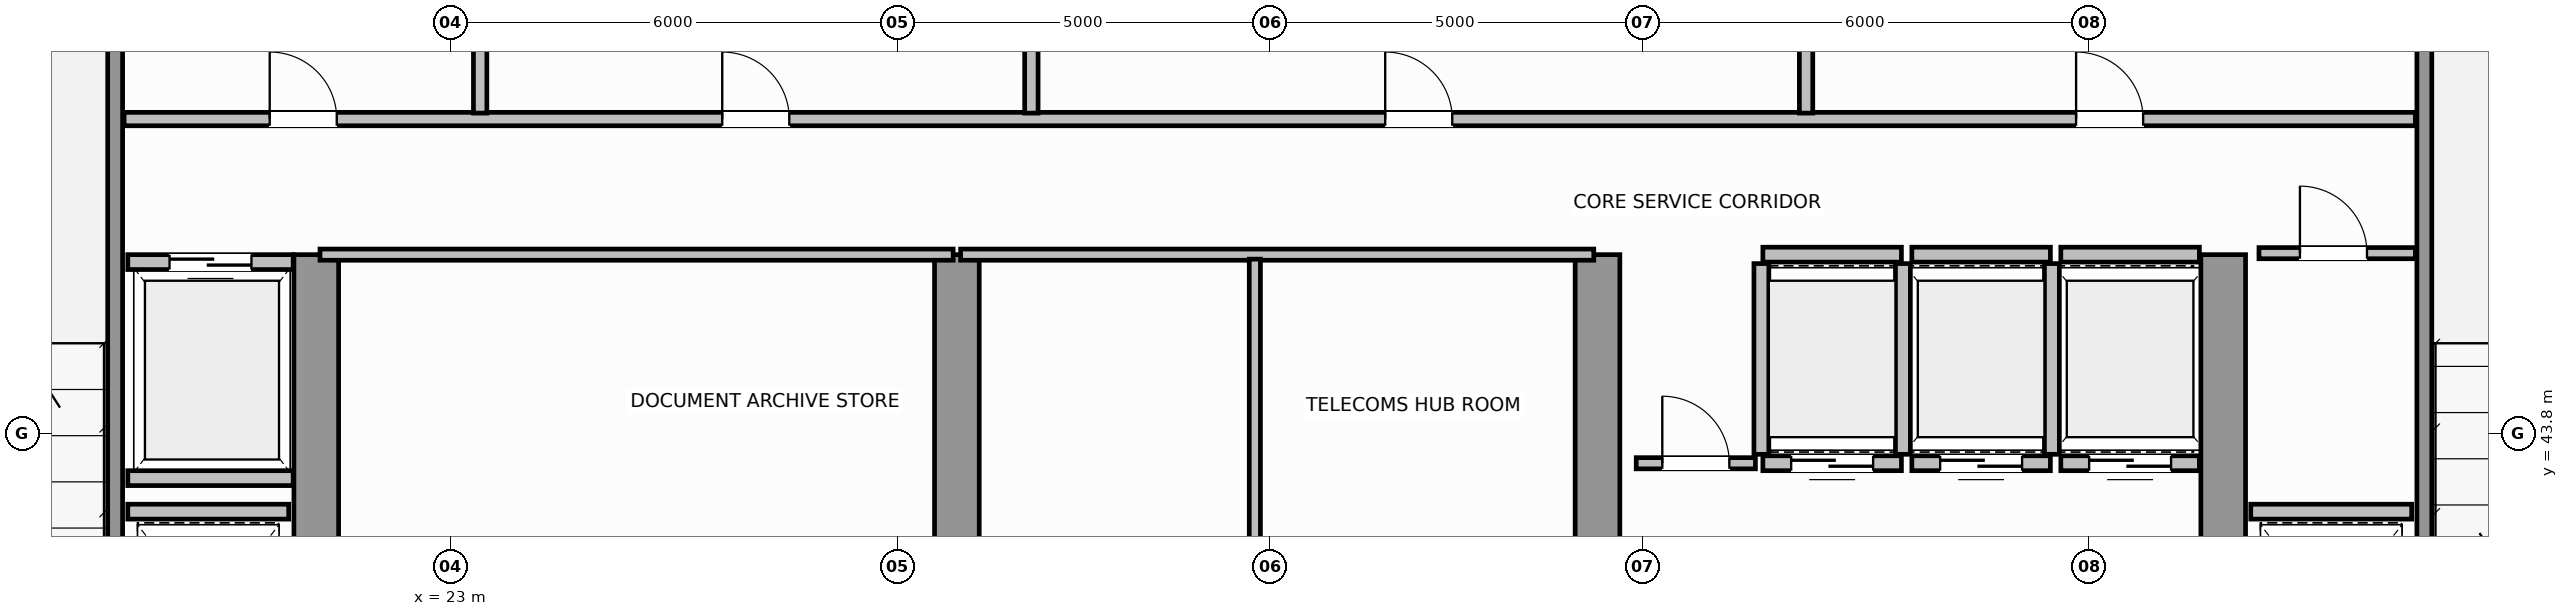
"""IFC4 building model, lengths in metres.
Left out: names, types, materials, properties, quantities, classifications, styles, units other than length and angle.
Written with IfcOpenShell. Run it as: python <this file> out.ifc"""

import sys

from ifc_helpers import new_model, si_unit, direction, frame, frame_2d, origin, place, context, subcontext, project, spatial, rectangle, extrude, source, transform, mapped, element, fill, save


model = new_model("IFC4")
c1 = context("Model", 3, precision=1e-05, world=origin(), true_north=direction((0.0, 1.0)))
c2 = subcontext(c1, "Body", "Model", "MODEL_VIEW")
j1 = project(units=[si_unit("LENGTHUNIT", "METRE"), si_unit("PLANEANGLEUNIT", "RADIAN")], contexts=[c1])
p1 = place(None, origin())
s1 = spatial("IfcSite", under=j1, at=p1, CompositionType="ELEMENT")
p2 = place(p1, origin())
s2 = spatial("IfcBuilding", under=s1, at=p2, CompositionType="ELEMENT")
p3 = place(p2, frame((0.0, 0.0, 238.4)))
s3 = spatial("IfcBuildingStorey", under=s2, at=p3, CompositionType="ELEMENT", Elevation=238.4)
for number, where, z_axis, x_axis in (
    (1, (21.2, 36.82, 0.0), (0.0, 0.0, 1.0), (0.0, 1.0, 0.0)),
    (2, (29.8, 36.82, 0.0), (0.0, 0.0, 1.0), (0.0, 1.0, 0.0)),
    (3, (38.4, 36.82, 0.0), (0.0, 0.0, 1.0), (0.0, 1.0, 0.0)),
    (4, (46.8, 36.82, 0.0), (0.0, 0.0, 1.0), (0.0, 1.0, 0.0)),
):
    element("IfcWall", number, at=place(p3, frame(where, z_axis=z_axis, x_axis=x_axis)), inside=s3, PredefinedType="SHEAR", context=c2, shape_type="SweptSolid", body=[
        extrude(rectangle(XDim=9.38, YDim=0.6, at=frame_2d((4.69, 0.0))), origin(), (0.0, 0.0, 1.0), 3.8),
    ])
for number, where, z_axis, x_axis in (
    (5, (18.5, 39.96, 0.0), (0.0, 0.0, 1.0), (0.0, 1.0, 0.0)),
    (6, (49.5, 39.96, 0.0), (0.0, 0.0, 1.0), (0.0, 1.0, 0.0)),
):
    element("IfcWall", number, at=place(p3, frame(where, z_axis=z_axis, x_axis=x_axis)), inside=s3, PredefinedType="SOLIDWALL", context=c2, shape_type="SweptSolid", body=[
        extrude(rectangle(XDim=9.93, YDim=0.2, at=frame_2d((4.965, 0.0))), origin(), (0.0, 0.0, 1.0), 3.8),
    ])
p4 = place(p3, frame((40.62, 43.4, 0.0), z_axis=(0.0, 0.0, 1.0), x_axis=(1.0, 0.0, 0.0)))
e7 = element("IfcWall", 7, at=p4, inside=s3, PredefinedType="SOLIDWALL", context=c2, shape_type="SweptSolid", body=[
    extrude(rectangle(XDim=1.86, YDim=0.2, at=frame_2d((0.93, 0.0))), origin(), (0.0, 0.0, 1.0), 3.58),
])
p5 = place(p4, frame((0.38, 0.0, 0.0)))
e8 = element("IfcOpeningElement", 8, at=p5, cuts=e7, PredefinedType="OPENING", context=c2, shape_type="SweptSolid", body=[
    extrude(rectangle(XDim=1.1, YDim=2.15, at=frame_2d((0.55, 1.075))), frame((0.0, 0.11, 0.0), z_axis=(0.0, -1.0, 0.0), x_axis=(1.0, 0.0, 0.0)), (0.0, 0.0, 1.0), 0.22),
])
p6 = place(p3, frame((40.62, 46.2, 0.0), z_axis=(0.0, 0.0, 1.0), x_axis=(1.0, 0.0, 0.0)))
e9 = element("IfcWall", 9, at=p6, inside=s3, PredefinedType="SOLIDWALL", context=c2, shape_type="SweptSolid", body=[
    extrude(rectangle(XDim=1.86, YDim=0.2, at=frame_2d((0.93, 0.0))), origin(), (0.0, 0.0, 1.0), 3.58),
])
for number, where, z_axis, x_axis in (
    (10, (40.6, 43.52, 0.0), (0.0, 0.0, 1.0), (0.0, 1.0, 0.0)),
    (11, (42.5, 43.52, 0.0), (0.0, 0.0, 1.0), (0.0, 1.0, 0.0)),
):
    element("IfcWall", number, at=place(p3, frame(where, z_axis=z_axis, x_axis=x_axis)), inside=s3, PredefinedType="SOLIDWALL", context=c2, shape_type="SweptSolid", body=[
        extrude(rectangle(XDim=2.56, YDim=0.2, at=frame_2d((1.28, 0.0))), origin(), (0.0, 0.0, 1.0), 3.58),
    ])
p7 = place(p3, frame((42.62, 43.4, 0.0), z_axis=(0.0, 0.0, 1.0), x_axis=(1.0, 0.0, 0.0)))
e12 = element("IfcWall", 12, at=p7, inside=s3, PredefinedType="SOLIDWALL", context=c2, shape_type="SweptSolid", body=[
    extrude(rectangle(XDim=1.86, YDim=0.2, at=frame_2d((0.93, 0.0))), origin(), (0.0, 0.0, 1.0), 3.58),
])
p8 = place(p7, frame((0.38, 0.0, 0.0)))
e13 = element("IfcOpeningElement", 13, at=p8, cuts=e12, PredefinedType="OPENING", context=c2, shape_type="SweptSolid", body=[
    extrude(rectangle(XDim=1.1, YDim=2.15, at=frame_2d((0.55, 1.075))), frame((0.0, 0.11, 0.0), z_axis=(0.0, -1.0, 0.0), x_axis=(1.0, 0.0, 0.0)), (0.0, 0.0, 1.0), 0.22),
])
p9 = place(p3, frame((42.62, 46.2, 0.0), z_axis=(0.0, 0.0, 1.0), x_axis=(1.0, 0.0, 0.0)))
e14 = element("IfcWall", 14, at=p9, inside=s3, PredefinedType="SOLIDWALL", context=c2, shape_type="SweptSolid", body=[
    extrude(rectangle(XDim=1.86, YDim=0.2, at=frame_2d((0.93, 0.0))), origin(), (0.0, 0.0, 1.0), 3.58),
])
p10 = place(p3, frame((44.5, 43.52, 0.0), z_axis=(0.0, 0.0, 1.0), x_axis=(0.0, 1.0, 0.0)))
e15 = element("IfcWall", 15, at=p10, inside=s3, PredefinedType="SOLIDWALL", context=c2, shape_type="SweptSolid", body=[
    extrude(rectangle(XDim=2.56, YDim=0.2, at=frame_2d((1.28, 0.0))), origin(), (0.0, 0.0, 1.0), 3.58),
])
p11 = place(p3, frame((44.62, 43.4, 0.0), z_axis=(0.0, 0.0, 1.0), x_axis=(1.0, 0.0, 0.0)))
e16 = element("IfcWall", 16, at=p11, inside=s3, PredefinedType="SOLIDWALL", context=c2, shape_type="SweptSolid", body=[
    extrude(rectangle(XDim=1.86, YDim=0.2, at=frame_2d((0.93, 0.0))), origin(), (0.0, 0.0, 1.0), 3.58),
])
p12 = place(p11, frame((0.38, 0.0, 0.0)))
e17 = element("IfcOpeningElement", 17, at=p12, cuts=e16, PredefinedType="OPENING", context=c2, shape_type="SweptSolid", body=[
    extrude(rectangle(XDim=1.1, YDim=2.15, at=frame_2d((0.55, 1.075))), frame((0.0, 0.11, 0.0), z_axis=(0.0, -1.0, 0.0), x_axis=(1.0, 0.0, 0.0)), (0.0, 0.0, 1.0), 0.22),
])
p13 = place(p3, frame((44.62, 46.2, 0.0), z_axis=(0.0, 0.0, 1.0), x_axis=(1.0, 0.0, 0.0)))
e18 = element("IfcWall", 18, at=p13, inside=s3, PredefinedType="SOLIDWALL", context=c2, shape_type="SweptSolid", body=[
    extrude(rectangle(XDim=1.86, YDim=0.2, at=frame_2d((0.93, 0.0))), origin(), (0.0, 0.0, 1.0), 3.58),
])
p14 = place(p3, frame((18.67, 46.1, 0.0), z_axis=(0.0, 0.0, 1.0), x_axis=(1.0, 0.0, 0.0)))
e19 = element("IfcWall", 19, at=p14, inside=s3, PredefinedType="SOLIDWALL", context=c2, shape_type="SweptSolid", body=[
    extrude(rectangle(XDim=2.22, YDim=0.2, at=frame_2d((1.11, 0.0))), origin(), (0.0, 0.0, 1.0), 3.58),
])
p15 = place(p14, frame((0.56, 0.0, 0.0)))
e20 = element("IfcOpeningElement", 20, at=p15, cuts=e19, PredefinedType="OPENING", context=c2, shape_type="SweptSolid", body=[
    extrude(rectangle(XDim=1.1, YDim=2.15, at=frame_2d((0.55, 1.075))), frame((0.0, 0.11, 0.0), z_axis=(0.0, -1.0, 0.0), x_axis=(1.0, 0.0, 0.0)), (0.0, 0.0, 1.0), 0.22),
])
p16 = place(p3, frame((18.67, 43.2, 0.0), z_axis=(0.0, 0.0, 1.0), x_axis=(1.0, 0.0, 0.0)))
e21 = element("IfcWall", 21, at=p16, inside=s3, PredefinedType="SOLIDWALL", context=c2, shape_type="SweptSolid", body=[
    extrude(rectangle(XDim=2.22, YDim=0.2, at=frame_2d((1.11, 0.0))), origin(), (0.0, 0.0, 1.0), 3.58),
])
for number, where, z_axis, x_axis in (
    (22, (18.67, 42.75, 0.0), (0.0, 0.0, 1.0), (1.0, 0.0, 0.0)),
    (23, (47.17, 42.75, 0.0), (0.0, 0.0, 1.0), (1.0, 0.0, 0.0)),
):
    element("IfcWall", number, at=place(p3, frame(where, z_axis=z_axis, x_axis=x_axis)), inside=s3, PredefinedType="SOLIDWALL", context=c2, shape_type="SweptSolid", body=[
        extrude(rectangle(XDim=2.16, YDim=0.2, at=frame_2d((1.08, 0.0))), origin(), (0.0, 0.0, 1.0), 3.58),
    ])
for number, where, z_axis, x_axis in (
    (24, (21.25, 46.2, 0.0), (0.0, 0.0, 1.0), (1.0, 0.0, 0.0)),
    (25, (29.85, 46.2, 0.0), (0.0, 0.0, 1.0), (1.0, 0.0, 0.0)),
):
    element("IfcWall", number, at=place(p3, frame(where, z_axis=z_axis, x_axis=x_axis)), inside=s3, PredefinedType="PARTITIONING", context=c2, shape_type="SweptSolid", body=[
        extrude(rectangle(XDim=8.5, YDim=0.15, at=frame_2d((4.25, 0.0))), origin(), (0.0, 0.0, 1.0), 3.58),
    ])
p17 = place(p3, frame((33.8, 36.56, 0.0), z_axis=(0.0, 0.0, 1.0), x_axis=(0.0, 1.0, 0.0)))
e26 = element("IfcWall", 26, at=p17, inside=s3, PredefinedType="PARTITIONING", context=c2, shape_type="SweptSolid", body=[
    extrude(rectangle(XDim=9.58, YDim=0.15, at=frame_2d((4.79, 0.0))), origin(), (0.0, 0.0, 1.0), 3.58),
])
p18 = place(p17, frame((4.2, 0.0, 0.0)))
e27 = element("IfcOpeningElement", 27, at=p18, cuts=e26, PredefinedType="OPENING", context=c2, shape_type="SweptSolid", body=[
    extrude(rectangle(XDim=0.9, YDim=2.1, at=frame_2d((0.45, 1.05))), frame((0.0, 0.085, 0.0), z_axis=(0.0, -1.0, 0.0), x_axis=(1.0, 0.0, 0.0)), (0.0, 0.0, 1.0), 0.17),
])
p19 = place(p3, frame((47.28, 46.22, 0.0), z_axis=(0.0, 0.0, 1.0), x_axis=(1.0, 0.0, 0.0)))
e28 = element("IfcWall", 28, at=p19, inside=s3, PredefinedType="PARTITIONING", context=c2, shape_type="SweptSolid", body=[
    extrude(rectangle(XDim=2.1, YDim=0.15, at=frame_2d((1.05, 0.0))), origin(), (0.0, 0.0, 1.0), 3.58),
])
p20 = place(p19, frame((0.55, 0.0, 0.0)))
e29 = element("IfcOpeningElement", 29, at=p20, cuts=e28, PredefinedType="OPENING", context=c2, shape_type="SweptSolid", body=[
    extrude(rectangle(XDim=0.9, YDim=2.1, at=frame_2d((0.45, 1.05))), frame((0.0, 0.085, 0.0), z_axis=(0.0, -1.0, 0.0), x_axis=(1.0, 0.0, 0.0)), (0.0, 0.0, 1.0), 0.17),
])
p21 = place(p3, frame((38.92, 43.4, 0.0), z_axis=(0.0, 0.0, 1.0), x_axis=(1.0, 0.0, 0.0)))
e30 = element("IfcWall", 30, at=p21, inside=s3, PredefinedType="PARTITIONING", context=c2, shape_type="SweptSolid", body=[
    extrude(rectangle(XDim=1.6, YDim=0.15, at=frame_2d((0.8, 0.0))), origin(), (0.0, 0.0, 1.0), 3.58),
])
p22 = place(p21, frame((0.35, 0.0, 0.0)))
e31 = element("IfcOpeningElement", 31, at=p22, cuts=e30, PredefinedType="OPENING", context=c2, shape_type="SweptSolid", body=[
    extrude(rectangle(XDim=0.9, YDim=2.1, at=frame_2d((0.45, 1.05))), frame((0.0, 0.085, 0.0), z_axis=(0.0, -1.0, 0.0), x_axis=(1.0, 0.0, 0.0)), (0.0, 0.0, 1.0), 0.17),
])
p23 = place(p3, frame((18.62, 48.02, 0.0), z_axis=(0.0, 0.0, 1.0), x_axis=(1.0, 0.0, 0.0)))
e32 = element("IfcWall", 32, at=p23, inside=s3, PredefinedType="PLUMBINGWALL", context=c2, shape_type="SweptSolid", body=[
    extrude(rectangle(XDim=30.76, YDim=0.18, at=frame_2d((15.38, 0.0))), origin(), (0.0, 0.0, 1.0), 3.58),
])
p24 = place(p23, frame((1.955, 0.0, 0.0)))
e33 = element("IfcOpeningElement", 33, at=p24, cuts=e32, PredefinedType="OPENING", context=c2, shape_type="SweptSolid", body=[
    extrude(rectangle(XDim=0.9, YDim=2.15, at=frame_2d((0.45, 1.075))), frame((0.0, 0.1, 0.0), z_axis=(0.0, -1.0, 0.0), x_axis=(1.0, 0.0, 0.0)), (0.0, 0.0, 1.0), 0.2),
])
p25 = place(p23, frame((8.03, 0.0, 0.0)))
e34 = element("IfcOpeningElement", 34, at=p25, cuts=e32, PredefinedType="OPENING", context=c2, shape_type="SweptSolid", body=[
    extrude(rectangle(XDim=0.9, YDim=2.15, at=frame_2d((0.45, 1.075))), frame((0.0, 0.1, 0.0), z_axis=(0.0, -1.0, 0.0), x_axis=(1.0, 0.0, 0.0)), (0.0, 0.0, 1.0), 0.2),
])
p26 = place(p23, frame((16.93, 0.0, 0.0)))
e35 = element("IfcOpeningElement", 35, at=p26, cuts=e32, PredefinedType="OPENING", context=c2, shape_type="SweptSolid", body=[
    extrude(rectangle(XDim=0.9, YDim=2.15, at=frame_2d((0.45, 1.075))), frame((0.0, 0.1, 0.0), z_axis=(0.0, -1.0, 0.0), x_axis=(1.0, 0.0, 0.0)), (0.0, 0.0, 1.0), 0.2),
])
p27 = place(p23, frame((26.205, 0.0, 0.0)))
e36 = element("IfcOpeningElement", 36, at=p27, cuts=e32, PredefinedType="OPENING", context=c2, shape_type="SweptSolid", body=[
    extrude(rectangle(XDim=0.9, YDim=2.15, at=frame_2d((0.45, 1.075))), frame((0.0, 0.1, 0.0), z_axis=(0.0, -1.0, 0.0), x_axis=(1.0, 0.0, 0.0)), (0.0, 0.0, 1.0), 0.2),
])
for number, where, z_axis, x_axis in (
    (37, (23.4, 48.1, 0.0), (0.0, 0.0, 1.0), (0.0, 1.0, 0.0)),
    (38, (30.8, 48.1, 0.0), (0.0, 0.0, 1.0), (0.0, 1.0, 0.0)),
    (39, (41.2, 48.1, 0.0), (0.0, 0.0, 1.0), (0.0, 1.0, 0.0)),
):
    element("IfcWall", number, at=place(p3, frame(where, z_axis=z_axis, x_axis=x_axis)), inside=s3, PredefinedType="PLUMBINGWALL", context=c2, shape_type="SweptSolid", body=[
        extrude(rectangle(XDim=2.28, YDim=0.18, at=frame_2d((1.14, 0.0))), origin(), (0.0, 0.0, 1.0), 3.58),
    ])
m1 = source(origin(), c2, "Body", "SweptSolid", [
    extrude(rectangle(XDim=1.1, YDim=2.15, at=frame_2d((0.55, 1.075))), frame((0.0, 0.025, 0.0), z_axis=(0.0, -1.0, 0.0), x_axis=(1.0, 0.0, 0.0)), (0.0, 0.0, 1.0), 0.05),
])
p28 = place(p5, origin())
e40 = element("IfcDoor", 40, at=p28, inside=s3, OperationType="DOUBLE_DOOR_SLIDING", PredefinedType="DOOR", context=c2, shape_type="MappedRepresentation", body=[
    mapped(m1, transform((0.0, 0.0, 0.0), scale=1.0)),
])
fill(e8, e40)
p29 = place(p8, origin())
e41 = element("IfcDoor", 41, at=p29, inside=s3, OperationType="DOUBLE_DOOR_SLIDING", PredefinedType="DOOR", context=c2, shape_type="MappedRepresentation", body=[
    mapped(m1, transform((0.0, 0.0, 0.0), scale=1.0)),
])
fill(e13, e41)
p30 = place(p12, origin())
e42 = element("IfcDoor", 42, at=p30, inside=s3, OperationType="DOUBLE_DOOR_SLIDING", PredefinedType="DOOR", context=c2, shape_type="MappedRepresentation", body=[
    mapped(m1, transform((0.0, 0.0, 0.0), scale=1.0)),
])
fill(e17, e42)
p31 = place(p15, origin())
e43 = element("IfcDoor", 43, at=p31, inside=s3, OperationType="DOUBLE_DOOR_SLIDING", PredefinedType="DOOR", context=c2, shape_type="MappedRepresentation", body=[
    mapped(m1, transform((0.0, 0.0, 0.0), scale=1.0)),
])
fill(e20, e43)
m2 = source(origin(), c2, "Body", "SweptSolid", [
    extrude(rectangle(XDim=0.9, YDim=2.1, at=frame_2d((0.45, 1.05))), frame((0.0, 0.025, 0.0), z_axis=(0.0, -1.0, 0.0), x_axis=(1.0, 0.0, 0.0)), (0.0, 0.0, 1.0), 0.05),
])
p32 = place(p20, origin())
e44 = element("IfcDoor", 44, at=p32, inside=s3, OperationType="SINGLE_SWING_RIGHT", PredefinedType="DOOR", context=c2, shape_type="MappedRepresentation", body=[
    mapped(m2, transform((0.0, 0.0, 0.0), scale=1.0)),
])
fill(e29, e44)
p33 = place(p22, origin())
e45 = element("IfcDoor", 45, at=p33, inside=s3, OperationType="SINGLE_SWING_LEFT", PredefinedType="DOOR", context=c2, shape_type="MappedRepresentation", body=[
    mapped(m2, transform((0.0, 0.0, 0.0), scale=1.0)),
])
fill(e31, e45)
m3 = source(origin(), c2, "Body", "SweptSolid", [
    extrude(rectangle(XDim=0.9, YDim=2.15, at=frame_2d((0.45, 1.075))), frame((0.0, 0.025, 0.0), z_axis=(0.0, -1.0, 0.0), x_axis=(1.0, 0.0, 0.0)), (0.0, 0.0, 1.0), 0.05),
])
p34 = place(p24, origin())
e46 = element("IfcDoor", 46, at=p34, inside=s3, OperationType="SINGLE_SWING_LEFT", PredefinedType="DOOR", context=c2, shape_type="MappedRepresentation", body=[
    mapped(m3, transform((0.0, 0.0, 0.0), scale=1.0)),
])
fill(e33, e46)
p35 = place(p25, origin())
e47 = element("IfcDoor", 47, at=p35, inside=s3, OperationType="SINGLE_SWING_RIGHT", PredefinedType="DOOR", context=c2, shape_type="MappedRepresentation", body=[
    mapped(m3, transform((0.0, 0.0, 0.0), scale=1.0)),
])
fill(e34, e47)
p36 = place(p26, origin())
e48 = element("IfcDoor", 48, at=p36, inside=s3, OperationType="SINGLE_SWING_LEFT", PredefinedType="DOOR", context=c2, shape_type="MappedRepresentation", body=[
    mapped(m3, transform((0.0, 0.0, 0.0), scale=1.0)),
])
fill(e35, e48)
p37 = place(p27, origin())
e49 = element("IfcDoor", 49, at=p37, inside=s3, OperationType="SINGLE_SWING_RIGHT", PredefinedType="DOOR", context=c2, shape_type="MappedRepresentation", body=[
    mapped(m3, transform((0.0, 0.0, 0.0), scale=1.0)),
])
fill(e36, e49)
save(model, sys.argv[1])
